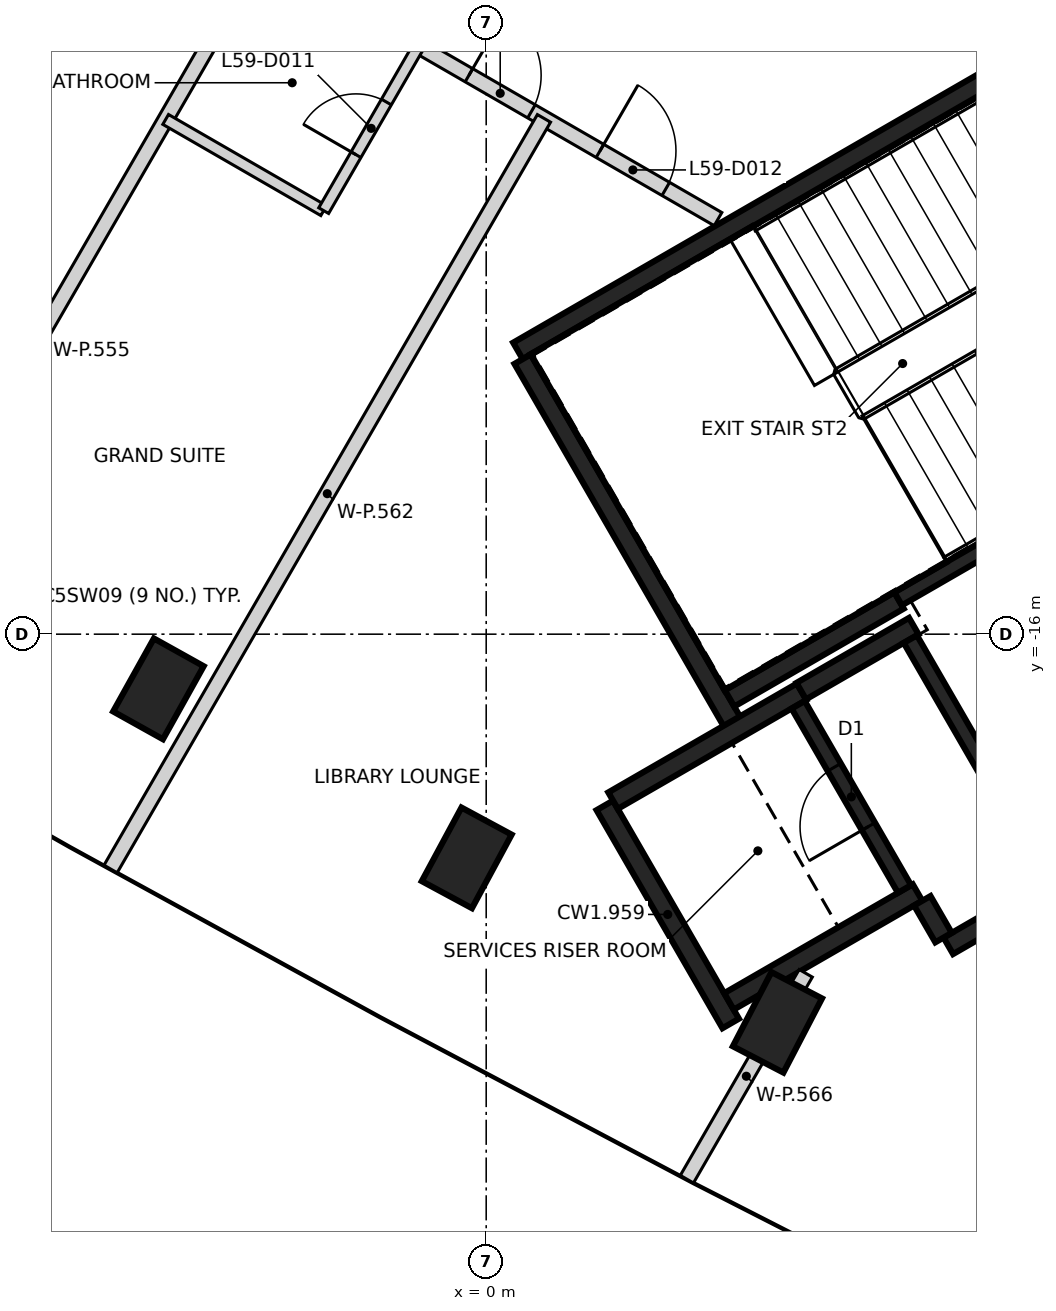
"""IFC4 building model, lengths in metres.
Left out: names, types, materials, properties, quantities, classifications, styles, units other than length and angle.
Written with IfcOpenShell. Run it as: python <this file> out.ifc"""

import sys

from ifc_helpers import new_model, si_unit, direction, frame, frame_2d, origin, origin_2d, place, context, subcontext, project, spatial, rectangle, extrude, element, fill, save


model = new_model("IFC4")
c1 = context("Model", 3, precision=1e-05, world=origin(), true_north=direction((0.0, 1.0)))
c2 = subcontext(c1, "Body", "Model", "MODEL_VIEW")
j1 = project(units=[si_unit("LENGTHUNIT", "METRE"), si_unit("PLANEANGLEUNIT", "RADIAN")], contexts=[c1])
p1 = place(None, origin())
s1 = spatial("IfcSite", under=j1, at=p1, CompositionType="ELEMENT")
p2 = place(p1, origin())
s2 = spatial("IfcBuilding", under=s1, at=p2, CompositionType="ELEMENT")
p3 = place(p2, frame((0.0, 0.0, 235.8)))
s3 = spatial("IfcBuildingStorey", under=s2, at=p3, CompositionType="ELEMENT", Elevation=235.8)
for number, where, z_axis, x_axis in (
    (1, (-4.312, -16.719, -0.35), (0.0, 0.0, 1.0), (0.487, 0.873, 0.0)),
    (2, (-0.256, -18.943, -0.35), (0.0, 0.0, 1.0), (0.475, 0.88, 0.0)),
    (3, (3.832, -21.107, -0.35), (0.0, 0.0, 1.0), (0.461, 0.887, 0.0)),
):
    element("IfcColumn", number, at=place(p3, frame(where, z_axis=z_axis, x_axis=x_axis)), inside=s3, PredefinedType="COLUMN", context=c2, shape_type="SweptSolid", body=[
        extrude(rectangle(XDim=1.1, YDim=0.75, at=origin_2d()), origin(), (0.0, 0.0, 1.0), 3.6),
    ])
p4 = place(p3, frame((0.417, -12.273, 0.0), z_axis=(0.0, 0.0, 1.0), x_axis=(0.866021906294, 0.500006057782, 0.0)))
e4 = element("IfcWall", 4, at=p4, inside=s3, PredefinedType="SHEAR", context=c2, shape_type="SweptSolid", body=[
    extrude(rectangle(XDim=11.55, YDim=0.25, at=frame_2d((5.775, 0.0))), origin(), (0.0, 0.0, 1.0), 3.25),
])
p5 = place(p4, frame((10.025, 0.0, 0.0)))
e5 = element("IfcOpeningElement", 5, at=p5, cuts=e4, PredefinedType="OPENING", context=c2, shape_type="SweptSolid", body=[
    extrude(rectangle(XDim=1.2, YDim=2.1, at=frame_2d((0.6, 1.05))), frame((0.0, 0.135, 0.0), z_axis=(0.0, -1.0, 0.0), x_axis=(1.0, 0.0, 0.0)), (0.0, 0.0, 1.0), 0.27),
])
p6 = place(p4, frame((8.725, 0.0, 0.0)))
e6 = element("IfcOpeningElement", 6, at=p6, cuts=e4, PredefinedType="OPENING", context=c2, shape_type="SweptSolid", body=[
    extrude(rectangle(XDim=1.2, YDim=2.1, at=frame_2d((0.6, 1.05))), frame((0.0, 0.135, 0.0), z_axis=(0.0, -1.0, 0.0), x_axis=(1.0, 0.0, 0.0)), (0.0, 0.0, 1.0), 0.27),
])
p7 = place(p3, frame((3.235, -17.153, 0.0), z_axis=(0.0, 0.0, 1.0), x_axis=(-0.500008851346, 0.866020293397, 0.0)))
e7 = element("IfcWall", 7, at=p7, inside=s3, PredefinedType="SHEAR", context=c2, shape_type="SweptSolid", body=[
    extrude(rectangle(XDim=5.51, YDim=0.25, at=frame_2d((2.755, 0.0))), origin(), (0.0, 0.0, 1.0), 3.25),
])
p8 = place(p3, frame((3.217, -21.122, 0.0), z_axis=(0.0, 0.0, 1.0), x_axis=(-0.499998874531, 0.866026053573, 0.0)))
e8 = element("IfcWall", 8, at=p8, inside=s3, PredefinedType="SHEAR", context=c2, shape_type="SweptSolid", body=[
    extrude(rectangle(XDim=3.313, YDim=0.25, at=frame_2d((1.656, 0.0))), origin(), (0.0, 0.0, 1.0), 3.25),
])
p9 = place(p3, frame((1.669, -18.19, 0.0), z_axis=(0.0, 0.0, 1.0), x_axis=(0.866042235819, 0.499970844928, 0.0)))
e9 = element("IfcWall", 9, at=p9, inside=s3, PredefinedType="SHEAR", context=c2, shape_type="SweptSolid", body=[
    extrude(rectangle(XDim=2.865, YDim=0.25, at=frame_2d((1.432, 0.0))), origin(), (0.0, 0.0, 1.0), 3.25),
])
p10 = place(p3, frame((5.675, -19.399, 0.0), z_axis=(0.0, 0.0, 1.0), x_axis=(-0.866026637627, -0.499997862916, 0.0)))
e10 = element("IfcWall", 10, at=p10, inside=s3, PredefinedType="SHEAR", context=c2, shape_type="SweptSolid", body=[
    extrude(rectangle(XDim=2.865, YDim=0.25, at=frame_2d((1.432, 0.0))), origin(), (0.0, 0.0, 1.0), 3.25),
])
p11 = place(p3, frame((5.431, -15.556, 0.0), z_axis=(0.0, 0.0, 1.0), x_axis=(-0.866022940537, -0.500004266446, 0.0)))
e11 = element("IfcWall", 11, at=p11, inside=s3, PredefinedType="SHEAR", context=c2, shape_type="SweptSolid", body=[
    extrude(rectangle(XDim=2.575, YDim=0.25, at=frame_2d((1.287, 0.0))), origin(), (0.0, 0.0, 1.0), 3.25),
])
p12 = place(p3, frame((4.145, -16.749, 0.0), z_axis=(0.0, 0.0, 1.0), x_axis=(0.866038183914, 0.499977863513, 0.0)))
e12 = element("IfcWall", 12, at=p12, inside=s3, PredefinedType="SHEAR", context=c2, shape_type="SweptSolid", body=[
    extrude(rectangle(XDim=1.71, YDim=0.25, at=frame_2d((0.855, 0.0))), origin(), (0.0, 0.0, 1.0), 3.25),
])
p13 = place(p3, frame((7.452, -19.308, 0.0), z_axis=(0.0, 0.0, 1.0), x_axis=(-0.866044474677, -0.49996696679, 0.0)))
e13 = element("IfcWall", 13, at=p13, inside=s3, PredefinedType="SHEAR", context=c2, shape_type="SweptSolid", body=[
    extrude(rectangle(XDim=1.584, YDim=0.25, at=frame_2d((0.792, 0.0))), origin(), (0.0, 0.0, 1.0), 3.25),
])
p14 = place(p3, frame((6.017, -19.992, 0.0), z_axis=(0.0, 0.0, 1.0), x_axis=(-0.500364886717, 0.865814633822, 0.0)))
e14 = element("IfcWall", 14, at=p14, inside=s3, PredefinedType="SHEAR", context=c2, shape_type="SweptSolid", body=[
    extrude(rectangle(XDim=0.559, YDim=0.25, at=frame_2d((0.28, 0.0))), origin(), (0.0, 0.0, 1.0), 3.25),
])
p15 = place(p3, frame((5.419, -15.534, 0.0), z_axis=(0.0, 0.0, 1.0), x_axis=(0.866029065029, 0.499993658486, 0.0)))
e15 = element("IfcWall", 15, at=p15, inside=s3, PredefinedType="SHEAR", context=c2, shape_type="SweptSolid", body=[
    extrude(rectangle(XDim=5.974, YDim=0.2, at=frame_2d((2.987, 0.0))), origin(), (0.0, 0.0, 1.0), 3.25),
])
p16 = place(p3, frame((5.503, -19.352, 0.0), z_axis=(0.0, 0.0, 1.0), x_axis=(-0.499986818241, 0.866033014143, 0.0)))
e16 = element("IfcWall", 16, at=p16, inside=s3, PredefinedType="SHEAR", context=c2, shape_type="SweptSolid", body=[
    extrude(rectangle(XDim=2.798, YDim=0.2, at=frame_2d((1.399, 0.0))), origin(), (0.0, 0.0, 1.0), 3.25),
])
p17 = place(p16, frame((0.949, 0.0, 0.0)))
e17 = element("IfcOpeningElement", 17, at=p17, cuts=e16, PredefinedType="OPENING", context=c2, shape_type="SweptSolid", body=[
    extrude(rectangle(XDim=0.9, YDim=2.1, at=frame_2d((0.45, 1.05))), frame((0.0, 0.11, 0.0), z_axis=(0.0, -1.0, 0.0), x_axis=(1.0, 0.0, 0.0)), (0.0, 0.0, 1.0), 0.22),
])
p18 = place(p3, frame((6.96, -18.455, 0.0), z_axis=(0.0, 0.0, 1.0), x_axis=(-0.499926705758, 0.866067716099, 0.0)))
e18 = element("IfcWall", 18, at=p18, inside=s3, PredefinedType="SHEAR", context=c2, shape_type="SweptSolid", body=[
    extrude(rectangle(XDim=2.759, YDim=0.2, at=frame_2d((1.38, 0.0))), origin(), (0.0, 0.0, 1.0), 3.25),
])
p19 = place(p3, frame((-8.153, -4.069, 0.0), z_axis=(0.0, 0.0, 1.0), x_axis=(0.865955522833, -0.500121017829, 0.0)))
e19 = element("IfcWall", 19, at=p19, inside=s3, PredefinedType="PARTITIONING", context=c2, shape_type="SweptSolid", body=[
    extrude(rectangle(XDim=12.937, YDim=0.2, at=frame_2d((6.469, 0.0))), origin(), (0.0, 0.0, 1.0), 3.25),
])
p20 = place(p19, frame((3.337, 0.0, 0.0)))
e20 = element("IfcOpeningElement", 20, at=p20, cuts=e19, PredefinedType="OPENING", context=c2, shape_type="SweptSolid", body=[
    extrude(rectangle(XDim=1.0, YDim=2.1, at=frame_2d((0.5, 1.05))), frame((0.0, 0.11, 0.0), z_axis=(0.0, -1.0, 0.0), x_axis=(1.0, 0.0, 0.0)), (0.0, 0.0, 1.0), 0.22),
])
p21 = place(p19, frame((9.153, 0.0, 0.0)))
e21 = element("IfcOpeningElement", 21, at=p21, cuts=e19, PredefinedType="OPENING", context=c2, shape_type="SweptSolid", body=[
    extrude(rectangle(XDim=0.95, YDim=2.1, at=frame_2d((0.475, 1.05))), frame((0.0, 0.11, 0.0), z_axis=(0.0, -1.0, 0.0), x_axis=(1.0, 0.0, 0.0)), (0.0, 0.0, 1.0), 0.22),
])
p22 = place(p19, frame((11.144, 0.0, 0.0)))
e22 = element("IfcOpeningElement", 22, at=p22, cuts=e19, PredefinedType="OPENING", context=c2, shape_type="SweptSolid", body=[
    extrude(rectangle(XDim=1.0, YDim=2.1, at=frame_2d((0.5, 1.05))), frame((0.0, 0.11, 0.0), z_axis=(0.0, -1.0, 0.0), x_axis=(1.0, 0.0, 0.0)), (0.0, 0.0, 1.0), 0.22),
])
p23 = place(p3, frame((-8.688, -16.973, 0.0), z_axis=(0.0, 0.0, 1.0), x_axis=(0.500021643343, 0.866012907634, 0.0)))
e23 = element("IfcWall", 23, at=p23, inside=s3, PredefinedType="PARTITIONING", context=c2, shape_type="SweptSolid", body=[
    extrude(rectangle(XDim=11.443, YDim=0.2, at=frame_2d((5.721, 0.0))), origin(), (0.0, 0.0, 1.0), 2.35),
])
p24 = place(p3, frame((-4.942, -19.089, 0.0), z_axis=(0.0, 0.0, 1.0), x_axis=(0.500021458202, 0.866013014531, 0.0)))
e24 = element("IfcWall", 24, at=p24, inside=s3, PredefinedType="PARTITIONING", context=c2, shape_type="SweptSolid", body=[
    extrude(rectangle(XDim=11.403, YDim=0.2, at=frame_2d((5.701, 0.0))), origin(), (0.0, 0.0, 1.0), 2.35),
])
p25 = place(p3, frame((2.64, -23.17, 0.0), z_axis=(0.0, 0.0, 1.0), x_axis=(0.500017489778, 0.866015305821, 0.0)))
e25 = element("IfcWall", 25, at=p25, inside=s3, PredefinedType="PARTITIONING", context=c2, shape_type="SweptSolid", body=[
    extrude(rectangle(XDim=3.128, YDim=0.2, at=frame_2d((1.564, 0.0))), origin(), (0.0, 0.0, 1.0), 3.25),
])
p26 = place(p3, frame((-4.217, -9.228, 0.0), z_axis=(0.0, 0.0, 1.0), x_axis=(0.866100915363, -0.499869187296, 0.0)))
e26 = element("IfcWall", 26, at=p26, inside=s3, PredefinedType="PARTITIONING", context=c2, shape_type="SweptSolid", body=[
    extrude(rectangle(XDim=2.401, YDim=0.15, at=frame_2d((1.2, 0.0))), origin(), (0.0, 0.0, 1.0), 3.25),
])
p27 = place(p3, frame((-2.138, -10.428, 0.0), z_axis=(0.0, 0.0, 1.0), x_axis=(0.500004234368, 0.866022959057, 0.0)))
e27 = element("IfcWall", 27, at=p27, inside=s3, PredefinedType="PARTITIONING", context=c2, shape_type="SweptSolid", body=[
    extrude(rectangle(XDim=2.5, YDim=0.15, at=frame_2d((1.25, 0.0))), origin(), (0.0, 0.0, 1.0), 3.25),
])
p28 = place(p27, frame((0.85, 0.0, 0.0)))
e28 = element("IfcOpeningElement", 28, at=p28, cuts=e27, PredefinedType="OPENING", context=c2, shape_type="SweptSolid", body=[
    extrude(rectangle(XDim=0.8, YDim=2.1, at=frame_2d((0.4, 1.05))), frame((0.0, 0.085, 0.0), z_axis=(0.0, -1.0, 0.0), x_axis=(1.0, 0.0, 0.0)), (0.0, 0.0, 1.0), 0.17),
])
p29 = place(p17, origin())
e29 = element("IfcDoor", 29, at=p29, inside=s3, OperationType="SINGLE_SWING_LEFT", PredefinedType="DOOR", context=c2, shape_type="SweptSolid", body=[
    extrude(rectangle(XDim=0.9, YDim=2.1, at=frame_2d((0.45, 1.05))), frame((0.0, 0.025, 0.0), z_axis=(0.0, -1.0, 0.0), x_axis=(1.0, 0.0, 0.0)), (0.0, 0.0, 1.0), 0.05),
])
fill(e17, e29)
p30 = place(p21, frame((0.95, 0.0, 0.0), z_axis=(0.0, 0.0, 1.0), x_axis=(-1.0, 0.0, 0.0)))
e30 = element("IfcDoor", 30, at=p30, inside=s3, OperationType="SINGLE_SWING_LEFT", PredefinedType="DOOR", context=c2, shape_type="SweptSolid", body=[
    extrude(rectangle(XDim=0.95, YDim=2.1, at=frame_2d((0.475, 1.05))), frame((0.0, 0.025, 0.0), z_axis=(0.0, -1.0, 0.0), x_axis=(1.0, 0.0, 0.0)), (0.0, 0.0, 1.0), 0.05),
])
fill(e21, e30)
p31 = place(p28, origin())
e31 = element("IfcDoor", 31, at=p31, inside=s3, OperationType="SINGLE_SWING_LEFT", PredefinedType="DOOR", context=c2, shape_type="SweptSolid", body=[
    extrude(rectangle(XDim=0.8, YDim=2.1, at=frame_2d((0.4, 1.05))), frame((0.0, 0.025, 0.0), z_axis=(0.0, -1.0, 0.0), x_axis=(1.0, 0.0, 0.0)), (0.0, 0.0, 1.0), 0.05),
])
fill(e28, e31)
p32 = place(p22, frame((1.0, 0.0, 0.0), z_axis=(0.0, 0.0, 1.0), x_axis=(-1.0, 0.0, 0.0)))
e32 = element("IfcDoor", 32, at=p32, inside=s3, OperationType="SINGLE_SWING_LEFT", PredefinedType="DOOR", context=c2, shape_type="SweptSolid", body=[
    extrude(rectangle(XDim=1.0, YDim=2.1, at=frame_2d((0.5, 1.05))), frame((0.0, 0.025, 0.0), z_axis=(0.0, -1.0, 0.0), x_axis=(1.0, 0.0, 0.0)), (0.0, 0.0, 1.0), 0.05),
])
fill(e22, e32)
save(model, sys.argv[1])
